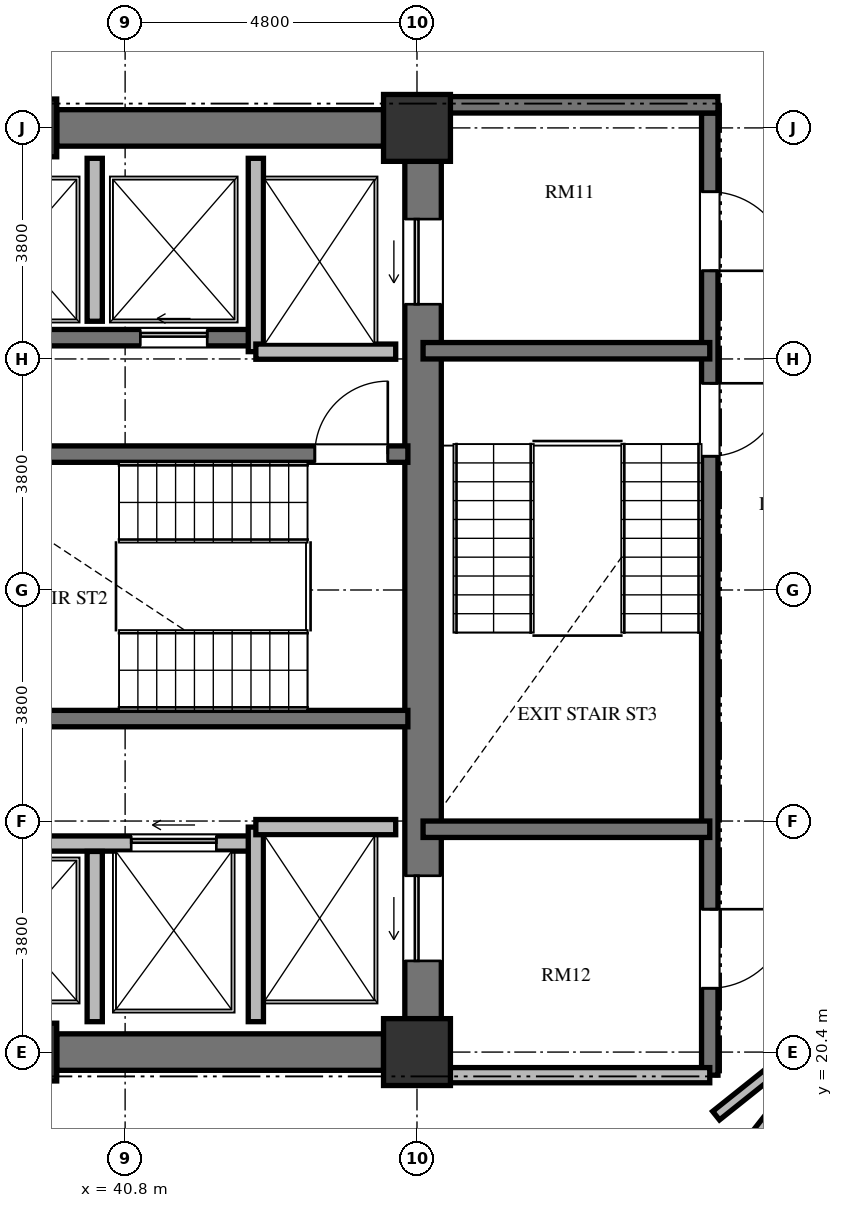
"""IFC4 building model, lengths in metres.
Left out: names, types, materials, properties, quantities, classifications, styles, units other than length and angle.
Written with IfcOpenShell. Run it as: python <this file> out.ifc"""

import sys

from ifc_helpers import new_model, si_unit, direction, frame, frame_2d, origin, origin_2d, place, context, subcontext, project, spatial, rectangle, extrude, element, fill, save


model = new_model("IFC4")
c1 = context("Model", 3, precision=1e-05, world=origin(), true_north=direction((0.0, 1.0)))
c2 = subcontext(c1, "Body", "Model", "MODEL_VIEW")
j1 = project(units=[si_unit("LENGTHUNIT", "METRE"), si_unit("PLANEANGLEUNIT", "RADIAN")], contexts=[c1])
p1 = place(None, origin())
s1 = spatial("IfcSite", under=j1, at=p1, CompositionType="ELEMENT")
p2 = place(p1, origin())
s2 = spatial("IfcBuilding", under=s1, at=p2, CompositionType="ELEMENT")
p3 = place(p2, frame((0.0, 0.0, 182.064)))
s3 = spatial("IfcBuildingStorey", under=s2, at=p3, CompositionType="ELEMENT", Elevation=182.064)
p4 = place(p3, frame((39.2, 20.4, 0.0), z_axis=(0.0, 0.0, 1.0), x_axis=(1.0, 0.0, 0.0)))
e1 = element("IfcColumn", 1, at=p4, inside=s3, PredefinedType="COLUMN", context=c2, shape_type="SweptSolid", body=[
    extrude(rectangle(XDim=0.95, YDim=0.95, at=origin_2d()), origin(), (0.0, 0.0, 1.0), 3.648),
])
for number, where, z_axis, x_axis in (
    (2, (45.6, 20.4, 0.0), (0.0, 0.0, 1.0), (1.0, 0.0, 0.0)),
    (3, (45.6, 35.6, 0.0), (0.0, 0.0, 1.0), (1.0, 0.0, 0.0)),
):
    element("IfcColumn", number, at=place(p3, frame(where, z_axis=z_axis, x_axis=x_axis)), inside=s3, PredefinedType="COLUMN", context=c2, shape_type="SweptSolid", body=[
        extrude(rectangle(XDim=1.1, YDim=1.1, at=origin_2d()), origin(), (0.0, 0.0, 1.0), 3.648),
    ])
p5 = place(p3, frame((39.2, 35.6, 0.0), z_axis=(0.0, 0.0, 1.0), x_axis=(1.0, 0.0, 0.0)))
e4 = element("IfcColumn", 4, at=p5, inside=s3, PredefinedType="COLUMN", context=c2, shape_type="SweptSolid", body=[
    extrude(rectangle(XDim=0.95, YDim=0.95, at=origin_2d()), origin(), (0.0, 0.0, 1.0), 3.648),
])
p6 = place(p3, frame((45.7, 20.95, 0.0), z_axis=(0.0, 0.0, 1.0), x_axis=(0.0, 1.0, 0.0)))
e5 = element("IfcWall", 5, at=p6, inside=s3, PredefinedType="SHEAR", context=c2, shape_type="SweptSolid", body=[
    extrude(rectangle(XDim=14.1, YDim=0.6, at=frame_2d((7.05, 0.0))), origin(), (0.0, 0.0, 1.0), 3.648),
])
p7 = place(p6, frame((11.75, 0.0, 0.0)))
e6 = element("IfcOpeningElement", 6, at=p7, cuts=e5, PredefinedType="OPENING", context=c2, shape_type="SweptSolid", body=[
    extrude(rectangle(XDim=1.4, YDim=2.3, at=frame_2d((0.7, 1.15))), frame((0.0, 0.31, 0.0), z_axis=(0.0, -1.0, 0.0), x_axis=(1.0, 0.0, 0.0)), (0.0, 0.0, 1.0), 0.62),
])
p8 = place(p6, frame((0.95, 0.0, 0.0)))
e7 = element("IfcOpeningElement", 7, at=p8, cuts=e5, PredefinedType="OPENING", context=c2, shape_type="SweptSolid", body=[
    extrude(rectangle(XDim=1.4, YDim=2.3, at=frame_2d((0.7, 1.15))), frame((0.0, 0.31, 0.0), z_axis=(0.0, -1.0, 0.0), x_axis=(1.0, 0.0, 0.0)), (0.0, 0.0, 1.0), 0.62),
])
for number, where, z_axis, x_axis in (
    (8, (39.675, 20.4, 0.0), (0.0, 0.0, 1.0), (1.0, 0.0, 0.0)),
    (9, (39.675, 35.6, 0.0), (0.0, 0.0, 1.0), (1.0, 0.0, 0.0)),
):
    element("IfcWall", number, at=place(p3, frame(where, z_axis=z_axis, x_axis=x_axis)), inside=s3, PredefinedType="SHEAR", context=c2, shape_type="SweptSolid", body=[
        extrude(rectangle(XDim=5.375, YDim=0.6, at=frame_2d((2.688, 0.0))), origin(), (0.0, 0.0, 1.0), 3.648),
    ])
p9 = place(p3, frame((37.465, 30.235, 0.0), z_axis=(0.0, 0.0, 1.0), x_axis=(1.0, 0.0, 0.0)))
e10 = element("IfcWall", 10, at=p9, inside=s3, PredefinedType="SHEAR", context=c2, shape_type="SweptSolid", body=[
    extrude(rectangle(XDim=7.985, YDim=0.27, at=frame_2d((3.992, 0.0))), origin(), (0.0, 0.0, 1.0), 3.648),
])
p10 = place(p9, frame((6.455, 0.0, 0.0)))
e11 = element("IfcOpeningElement", 11, at=p10, cuts=e10, PredefinedType="OPENING", context=c2, shape_type="SweptSolid", body=[
    extrude(rectangle(XDim=1.2, YDim=2.15, at=frame_2d((0.6, 1.075))), frame((0.0, 0.145, 0.0), z_axis=(0.0, -1.0, 0.0), x_axis=(1.0, 0.0, 0.0)), (0.0, 0.0, 1.0), 0.29),
])
p11 = place(p3, frame((37.465, 25.885, 0.0), z_axis=(0.0, 0.0, 1.0), x_axis=(1.0, 0.0, 0.0)))
e12 = element("IfcWall", 12, at=p11, inside=s3, PredefinedType="SHEAR", context=c2, shape_type="SweptSolid", body=[
    extrude(rectangle(XDim=7.985, YDim=0.27, at=frame_2d((3.992, 0.0))), origin(), (0.0, 0.0, 1.0), 3.648),
])
p12 = place(p3, frame((26.55, 32.15, 0.0), z_axis=(0.0, 0.0, 1.0), x_axis=(1.0, 0.0, 0.0)))
e13 = element("IfcWall", 13, at=p12, inside=s3, PredefinedType="SHEAR", context=c2, shape_type="SweptSolid", body=[
    extrude(rectangle(XDim=16.4, YDim=0.27, at=frame_2d((8.2, 0.0))), origin(), (0.0, 0.0, 1.0), 3.648),
])
p13 = place(p12, frame((1.525, 0.0, 0.0)))
e14 = element("IfcOpeningElement", 14, at=p13, cuts=e13, PredefinedType="OPENING", context=c2, shape_type="SweptSolid", body=[
    extrude(rectangle(XDim=1.05, YDim=2.15, at=frame_2d((0.525, 1.075))), frame((0.0, 0.145, 0.0), z_axis=(0.0, -1.0, 0.0), x_axis=(1.0, 0.0, 0.0)), (0.0, 0.0, 1.0), 0.29),
])
p14 = place(p12, frame((4.275, 0.0, 0.0)))
e15 = element("IfcOpeningElement", 15, at=p14, cuts=e13, PredefinedType="OPENING", context=c2, shape_type="SweptSolid", body=[
    extrude(rectangle(XDim=0.95, YDim=2.1, at=frame_2d((0.475, 1.05))), frame((0.0, 0.145, 0.0), z_axis=(0.0, -1.0, 0.0), x_axis=(1.0, 0.0, 0.0)), (0.0, 0.0, 1.0), 0.29),
])
p15 = place(p12, frame((6.5, 0.0, 0.0)))
e16 = element("IfcOpeningElement", 16, at=p15, cuts=e13, PredefinedType="OPENING", context=c2, shape_type="SweptSolid", body=[
    extrude(rectangle(XDim=1.1, YDim=2.2, at=frame_2d((0.55, 1.1))), frame((0.0, 0.145, 0.0), z_axis=(0.0, -1.0, 0.0), x_axis=(1.0, 0.0, 0.0)), (0.0, 0.0, 1.0), 0.29),
])
p16 = place(p12, frame((9.1, 0.0, 0.0)))
e17 = element("IfcOpeningElement", 17, at=p16, cuts=e13, PredefinedType="OPENING", context=c2, shape_type="SweptSolid", body=[
    extrude(rectangle(XDim=1.1, YDim=2.2, at=frame_2d((0.55, 1.1))), frame((0.0, 0.145, 0.0), z_axis=(0.0, -1.0, 0.0), x_axis=(1.0, 0.0, 0.0)), (0.0, 0.0, 1.0), 0.29),
])
p17 = place(p12, frame((11.9, 0.0, 0.0)))
e18 = element("IfcOpeningElement", 18, at=p17, cuts=e13, PredefinedType="OPENING", context=c2, shape_type="SweptSolid", body=[
    extrude(rectangle(XDim=1.1, YDim=2.2, at=frame_2d((0.55, 1.1))), frame((0.0, 0.145, 0.0), z_axis=(0.0, -1.0, 0.0), x_axis=(1.0, 0.0, 0.0)), (0.0, 0.0, 1.0), 0.29),
])
p18 = place(p12, frame((14.5, 0.0, 0.0)))
e19 = element("IfcOpeningElement", 19, at=p18, cuts=e13, PredefinedType="OPENING", context=c2, shape_type="SweptSolid", body=[
    extrude(rectangle(XDim=1.1, YDim=2.2, at=frame_2d((0.55, 1.1))), frame((0.0, 0.145, 0.0), z_axis=(0.0, -1.0, 0.0), x_axis=(1.0, 0.0, 0.0)), (0.0, 0.0, 1.0), 0.29),
])
p19 = place(p3, frame((26.75, 23.83, 0.0), z_axis=(0.0, 0.0, 1.0), x_axis=(1.0, 0.0, 0.0)))
e20 = element("IfcWall", 20, at=p19, inside=s3, PredefinedType="SOLIDWALL", context=c2, shape_type="SweptSolid", body=[
    extrude(rectangle(XDim=16.2, YDim=0.25, at=frame_2d((8.1, 0.0))), origin(), (0.0, 0.0, 1.0), 3.428),
])
p20 = place(p19, frame((0.335, 0.0, 0.0)))
e21 = element("IfcOpeningElement", 21, at=p20, cuts=e20, PredefinedType="OPENING", context=c2, shape_type="SweptSolid", body=[
    extrude(rectangle(XDim=0.95, YDim=2.1, at=frame_2d((0.475, 1.05))), frame((0.0, 0.135, 0.0), z_axis=(0.0, -1.0, 0.0), x_axis=(1.0, 0.0, 0.0)), (0.0, 0.0, 1.0), 0.27),
])
p21 = place(p19, frame((2.975, 0.0, 0.0)))
e22 = element("IfcOpeningElement", 22, at=p21, cuts=e20, PredefinedType="OPENING", context=c2, shape_type="SweptSolid", body=[
    extrude(rectangle(XDim=1.05, YDim=2.15, at=frame_2d((0.525, 1.075))), frame((0.0, 0.135, 0.0), z_axis=(0.0, -1.0, 0.0), x_axis=(1.0, 0.0, 0.0)), (0.0, 0.0, 1.0), 0.27),
])
p22 = place(p19, frame((6.3, 0.0, 0.0)))
e23 = element("IfcOpeningElement", 23, at=p22, cuts=e20, PredefinedType="OPENING", context=c2, shape_type="SweptSolid", body=[
    extrude(rectangle(XDim=1.1, YDim=2.2, at=frame_2d((0.55, 1.1))), frame((0.0, 0.135, 0.0), z_axis=(0.0, -1.0, 0.0), x_axis=(1.0, 0.0, 0.0)), (0.0, 0.0, 1.0), 0.27),
])
p23 = place(p19, frame((8.9, 0.0, 0.0)))
e24 = element("IfcOpeningElement", 24, at=p23, cuts=e20, PredefinedType="OPENING", context=c2, shape_type="SweptSolid", body=[
    extrude(rectangle(XDim=1.1, YDim=2.2, at=frame_2d((0.55, 1.1))), frame((0.0, 0.135, 0.0), z_axis=(0.0, -1.0, 0.0), x_axis=(1.0, 0.0, 0.0)), (0.0, 0.0, 1.0), 0.27),
])
p24 = place(p19, frame((11.7, 0.0, 0.0)))
e25 = element("IfcOpeningElement", 25, at=p24, cuts=e20, PredefinedType="OPENING", context=c2, shape_type="SweptSolid", body=[
    extrude(rectangle(XDim=1.1, YDim=2.2, at=frame_2d((0.55, 1.1))), frame((0.0, 0.135, 0.0), z_axis=(0.0, -1.0, 0.0), x_axis=(1.0, 0.0, 0.0)), (0.0, 0.0, 1.0), 0.27),
])
p25 = place(p19, frame((14.15, 0.0, 0.0)))
e26 = element("IfcOpeningElement", 26, at=p25, cuts=e20, PredefinedType="OPENING", context=c2, shape_type="SweptSolid", body=[
    extrude(rectangle(XDim=1.4, YDim=2.3, at=frame_2d((0.7, 1.15))), frame((0.0, 0.135, 0.0), z_axis=(0.0, -1.0, 0.0), x_axis=(1.0, 0.0, 0.0)), (0.0, 0.0, 1.0), 0.27),
])
p26 = place(p3, frame((42.95, 31.92, 0.0), z_axis=(0.0, 0.0, 1.0), x_axis=(0.0, 1.0, 0.0)))
e27 = element("IfcWall", 27, at=p26, inside=s3, PredefinedType="SOLIDWALL", context=c2, shape_type="SweptSolid", body=[
    extrude(rectangle(XDim=3.18, YDim=0.25, at=frame_2d((1.59, 0.0))), origin(), (0.0, 0.0, 1.0), 3.428),
])
p27 = place(p3, frame((42.95, 31.92, 0.0), z_axis=(0.0, 0.0, 1.0), x_axis=(1.0, 0.0, 0.0)))
e28 = element("IfcWall", 28, at=p27, inside=s3, PredefinedType="SOLIDWALL", context=c2, shape_type="SweptSolid", body=[
    extrude(rectangle(XDim=2.3, YDim=0.25, at=frame_2d((1.15, 0.0))), origin(), (0.0, 0.0, 1.0), 3.428),
])
p28 = place(p3, frame((42.95, 20.9, 0.0), z_axis=(0.0, 0.0, 1.0), x_axis=(0.0, 1.0, 0.0)))
e29 = element("IfcWall", 29, at=p28, inside=s3, PredefinedType="SOLIDWALL", context=c2, shape_type="SweptSolid", body=[
    extrude(rectangle(XDim=3.2, YDim=0.25, at=frame_2d((1.6, 0.0))), origin(), (0.0, 0.0, 1.0), 3.428),
])
p29 = place(p3, frame((42.95, 24.1, 0.0), z_axis=(0.0, 0.0, 1.0), x_axis=(1.0, 0.0, 0.0)))
e30 = element("IfcWall", 30, at=p29, inside=s3, PredefinedType="SOLIDWALL", context=c2, shape_type="SweptSolid", body=[
    extrude(rectangle(XDim=2.3, YDim=0.25, at=frame_2d((1.15, 0.0))), origin(), (0.0, 0.0, 1.0), 3.428),
])
p30 = place(p3, frame((40.3, 32.42, 0.0), z_axis=(0.0, 0.0, 1.0), x_axis=(0.0, 1.0, 0.0)))
e31 = element("IfcWall", 31, at=p30, inside=s3, PredefinedType="SOLIDWALL", context=c2, shape_type="SweptSolid", body=[
    extrude(rectangle(XDim=2.68, YDim=0.25, at=frame_2d((1.34, 0.0))), origin(), (0.0, 0.0, 1.0), 3.428),
])
p31 = place(p3, frame((40.3, 20.9, 0.0), z_axis=(0.0, 0.0, 1.0), x_axis=(0.0, 1.0, 0.0)))
e32 = element("IfcWall", 32, at=p31, inside=s3, PredefinedType="SOLIDWALL", context=c2, shape_type="SweptSolid", body=[
    extrude(rectangle(XDim=2.8, YDim=0.25, at=frame_2d((1.4, 0.0))), origin(), (0.0, 0.0, 1.0), 3.428),
])
p32 = place(p3, frame((50.415, 35.845, 0.0), z_axis=(0.0, 0.0, 1.0), x_axis=(0.0, -1.0, 0.0)))
e33 = element("IfcWall", 33, at=p32, inside=s3, PredefinedType="SHEAR", context=c2, shape_type="SweptSolid", body=[
    extrude(rectangle(XDim=15.825, YDim=0.27, at=frame_2d((7.913, 0.0))), origin(), (0.0, 0.0, 1.0), 3.648),
])
p33 = place(p32, frame((4.445, 0.0, 0.0)))
e34 = element("IfcOpeningElement", 34, at=p33, cuts=e33, PredefinedType="OPENING", context=c2, shape_type="SweptSolid", body=[
    extrude(rectangle(XDim=1.2, YDim=2.15, at=frame_2d((0.6, 1.075))), frame((0.0, 0.145, 0.0), z_axis=(0.0, -1.0, 0.0), x_axis=(1.0, 0.0, 0.0)), (0.0, 0.0, 1.0), 0.29),
])
p34 = place(p32, frame((1.295, 0.0, 0.0)))
e35 = element("IfcOpeningElement", 35, at=p34, cuts=e33, PredefinedType="OPENING", context=c2, shape_type="SweptSolid", body=[
    extrude(rectangle(XDim=1.3, YDim=2.2, at=frame_2d((0.65, 1.1))), frame((0.0, 0.145, 0.0), z_axis=(0.0, -1.0, 0.0), x_axis=(1.0, 0.0, 0.0)), (0.0, 0.0, 1.0), 0.29),
])
p35 = place(p32, frame((13.095, 0.0, 0.0)))
e36 = element("IfcOpeningElement", 36, at=p35, cuts=e33, PredefinedType="OPENING", context=c2, shape_type="SweptSolid", body=[
    extrude(rectangle(XDim=1.3, YDim=2.2, at=frame_2d((0.65, 1.1))), frame((0.0, 0.145, 0.0), z_axis=(0.0, -1.0, 0.0), x_axis=(1.0, 0.0, 0.0)), (0.0, 0.0, 1.0), 0.29),
])
p36 = place(p3, frame((46.0, 35.98, 0.0), z_axis=(0.0, 0.0, 1.0), x_axis=(1.0, 0.0, 0.0)))
e37 = element("IfcWall", 37, at=p36, inside=s3, PredefinedType="SHEAR", context=c2, shape_type="SweptSolid", body=[
    extrude(rectangle(XDim=4.55, YDim=0.27, at=frame_2d((2.275, 0.0))), origin(), (0.0, 0.0, 1.0), 3.648),
])
for number, where, z_axis, x_axis in (
    (38, (45.7, 31.935, 0.0), (0.0, 0.0, 1.0), (1.0, 0.0, 0.0)),
    (39, (45.7, 24.065, 0.0), (0.0, 0.0, 1.0), (1.0, 0.0, 0.0)),
):
    element("IfcWall", number, at=place(p3, frame(where, z_axis=z_axis, x_axis=x_axis)), inside=s3, PredefinedType="SHEAR", context=c2, shape_type="SweptSolid", body=[
        extrude(rectangle(XDim=4.715, YDim=0.27, at=frame_2d((2.357, 0.0))), origin(), (0.0, 0.0, 1.0), 3.648),
    ])
p37 = place(p3, frame((45.7, 20.02, 0.0), z_axis=(0.0, 0.0, 1.0), x_axis=(1.0, 0.0, 0.0)))
e40 = element("IfcWall", 40, at=p37, inside=s3, PredefinedType="SOLIDWALL", context=c2, shape_type="SweptSolid", body=[
    extrude(rectangle(XDim=4.715, YDim=0.25, at=frame_2d((2.357, 0.0))), origin(), (0.0, 0.0, 1.0), 3.428),
])
p38 = place(p3, frame((53.181, 21.481, 0.0), z_axis=(0.0, 0.0, 1.0), x_axis=(-0.781420737726, -0.624004511724, 0.0)))
e41 = element("IfcWall", 41, at=p38, inside=s3, PredefinedType="PARTITIONING", context=c2, shape_type="SweptSolid", body=[
    extrude(rectangle(XDim=3.407, YDim=0.18, at=frame_2d((1.704, 0.0))), origin(), (0.0, 0.0, 1.0), 3.428),
])
p39 = place(p3, frame((52.537, 20.783, 0.0), z_axis=(0.0, 0.0, 1.0), x_axis=(-0.617570357244, -0.786515641201, 0.0)))
e42 = element("IfcWall", 42, at=p39, inside=s3, PredefinedType="PARTITIONING", context=c2, shape_type="SweptSolid", body=[
    extrude(rectangle(XDim=6.74, YDim=0.15, at=frame_2d((3.37, 0.0))), origin(), (0.0, 0.0, 1.0), 2.863),
])
p40 = place(p10, origin())
e43 = element("IfcDoor", 43, at=p40, inside=s3, OperationType="SINGLE_SWING_RIGHT", PredefinedType="DOOR", context=c2, shape_type="SweptSolid", body=[
    extrude(rectangle(XDim=1.2, YDim=2.15, at=frame_2d((0.6, 1.075))), frame((0.0, 0.025, 0.0), z_axis=(0.0, -1.0, 0.0), x_axis=(1.0, 0.0, 0.0)), (0.0, 0.0, 1.0), 0.05),
])
fill(e11, e43)
p41 = place(p18, origin())
e44 = element("IfcDoor", 44, at=p41, inside=s3, OperationType="SLIDING_TO_LEFT", PredefinedType="DOOR", context=c2, shape_type="SweptSolid", body=[
    extrude(rectangle(XDim=1.1, YDim=2.2, at=frame_2d((0.55, 1.1))), frame((0.0, 0.025, 0.0), z_axis=(0.0, -1.0, 0.0), x_axis=(1.0, 0.0, 0.0)), (0.0, 0.0, 1.0), 0.05),
])
fill(e19, e44)
p42 = place(p7, origin())
e45 = element("IfcDoor", 45, at=p42, inside=s3, OperationType="SLIDING_TO_LEFT", PredefinedType="DOOR", context=c2, shape_type="SweptSolid", body=[
    extrude(rectangle(XDim=1.4, YDim=2.3, at=frame_2d((0.7, 1.15))), frame((0.0, 0.025, 0.0), z_axis=(0.0, -1.0, 0.0), x_axis=(1.0, 0.0, 0.0)), (0.0, 0.0, 1.0), 0.05),
])
fill(e6, e45)
p43 = place(p8, origin())
e46 = element("IfcDoor", 46, at=p43, inside=s3, OperationType="SLIDING_TO_LEFT", PredefinedType="DOOR", context=c2, shape_type="SweptSolid", body=[
    extrude(rectangle(XDim=1.4, YDim=2.3, at=frame_2d((0.7, 1.15))), frame((0.0, 0.025, 0.0), z_axis=(0.0, -1.0, 0.0), x_axis=(1.0, 0.0, 0.0)), (0.0, 0.0, 1.0), 0.05),
])
fill(e7, e46)
p44 = place(p25, origin())
e47 = element("IfcDoor", 47, at=p44, inside=s3, OperationType="SLIDING_TO_LEFT", PredefinedType="DOOR", context=c2, shape_type="SweptSolid", body=[
    extrude(rectangle(XDim=1.4, YDim=2.3, at=frame_2d((0.7, 1.15))), frame((0.0, 0.025, 0.0), z_axis=(0.0, -1.0, 0.0), x_axis=(1.0, 0.0, 0.0)), (0.0, 0.0, 1.0), 0.05),
])
fill(e26, e47)
p45 = place(p33, origin())
e48 = element("IfcDoor", 48, at=p45, inside=s3, OperationType="SINGLE_SWING_LEFT", PredefinedType="DOOR", context=c2, shape_type="SweptSolid", body=[
    extrude(rectangle(XDim=1.2, YDim=2.15, at=frame_2d((0.6, 1.075))), frame((0.0, 0.025, 0.0), z_axis=(0.0, -1.0, 0.0), x_axis=(1.0, 0.0, 0.0)), (0.0, 0.0, 1.0), 0.05),
])
fill(e34, e48)
p46 = place(p34, origin())
e49 = element("IfcDoor", 49, at=p46, inside=s3, OperationType="SINGLE_SWING_RIGHT", PredefinedType="DOOR", context=c2, shape_type="SweptSolid", body=[
    extrude(rectangle(XDim=1.3, YDim=2.2, at=frame_2d((0.65, 1.1))), frame((0.0, 0.025, 0.0), z_axis=(0.0, -1.0, 0.0), x_axis=(1.0, 0.0, 0.0)), (0.0, 0.0, 1.0), 0.05),
])
fill(e35, e49)
p47 = place(p35, origin())
e50 = element("IfcDoor", 50, at=p47, inside=s3, OperationType="SINGLE_SWING_LEFT", PredefinedType="DOOR", context=c2, shape_type="SweptSolid", body=[
    extrude(rectangle(XDim=1.3, YDim=2.2, at=frame_2d((0.65, 1.1))), frame((0.0, 0.025, 0.0), z_axis=(0.0, -1.0, 0.0), x_axis=(1.0, 0.0, 0.0)), (0.0, 0.0, 1.0), 0.05),
])
fill(e36, e50)
save(model, sys.argv[1])
